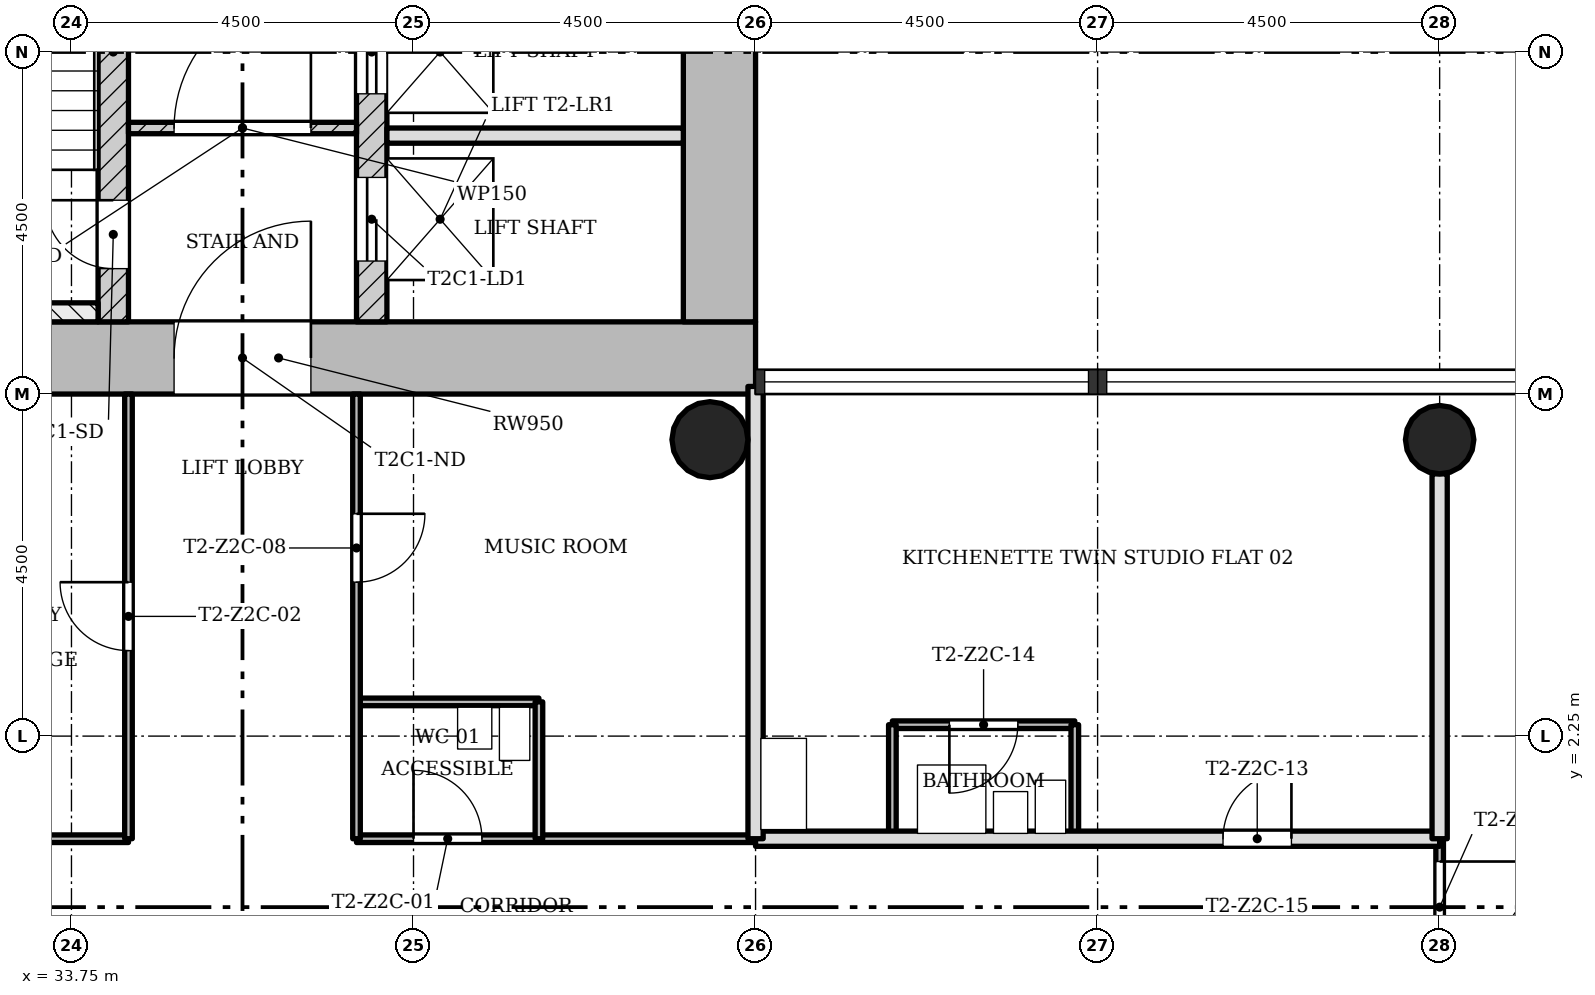
"""IFC4 building model, lengths in metres.
Left out: names, types, materials, properties, quantities, classifications, styles, units other than length and angle.
Written with IfcOpenShell. Run it as: python <this file> out.ifc"""

import sys

from ifc_helpers import new_model, si_unit, direction, frame, frame_2d, origin, origin_2d, place, context, subcontext, project, spatial, rectangle, hollow_circle, extrude, element, fill, save


model = new_model("IFC4")
c1 = context("Model", 3, precision=1e-05, world=origin(), true_north=direction((0.0, 1.0)))
c2 = subcontext(c1, "Body", "Model", "MODEL_VIEW")
j1 = project(units=[si_unit("LENGTHUNIT", "METRE"), si_unit("PLANEANGLEUNIT", "RADIAN")], contexts=[c1])
p1 = place(None, origin())
s1 = spatial("IfcSite", under=j1, at=p1, CompositionType="ELEMENT")
p2 = place(p1, origin())
s2 = spatial("IfcBuilding", under=s1, at=p2, CompositionType="ELEMENT")
p3 = place(p2, frame((0.0, 0.0, 90.2)))
s3 = spatial("IfcBuildingStorey", under=s2, at=p3, CompositionType="ELEMENT", Elevation=90.2)
p4 = place(p3, frame((30.2, 7.225, 0.0), z_axis=(0.0, 0.0, 1.0), x_axis=(1.0, 0.0, 0.0)))
e1 = element("IfcWall", 1, at=p4, inside=s3, PredefinedType="SHEAR", context=c2, shape_type="SweptSolid", body=[
    extrude(rectangle(XDim=12.55, YDim=0.95, at=frame_2d((6.275, 0.0))), origin(), (0.0, 0.0, 1.0), 3.4),
])
p5 = place(p4, frame((4.9, 0.0, 0.0)))
e2 = element("IfcOpeningElement", 2, at=p5, cuts=e1, PredefinedType="OPENING", context=c2, shape_type="SweptSolid", body=[
    extrude(rectangle(XDim=1.8, YDim=2.1, at=frame_2d((0.9, 1.05))), frame((0.0, 0.485, 0.0), z_axis=(0.0, -1.0, 0.0), x_axis=(1.0, 0.0, 0.0)), (0.0, 0.0, 1.0), 0.97),
])
p6 = place(p3, frame((42.275, 7.7, 0.0), z_axis=(0.0, 0.0, 1.0), x_axis=(0.0, 1.0, 0.0)))
e3 = element("IfcWall", 3, at=p6, inside=s3, PredefinedType="SHEAR", context=c2, shape_type="SweptSolid", body=[
    extrude(rectangle(XDim=8.05, YDim=0.95, at=frame_2d((4.025, 0.0))), origin(), (0.0, 0.0, 1.0), 3.4),
])
p7 = place(p3, frame((34.3, 7.7, 0.0), z_axis=(0.0, 0.0, 1.0), x_axis=(0.0, 1.0, 0.0)))
e4 = element("IfcWall", 4, at=p7, inside=s3, PredefinedType="SHEAR", context=c2, shape_type="SweptSolid", body=[
    extrude(rectangle(XDim=7.1, YDim=0.4, at=frame_2d((3.55, 0.0))), origin(), (0.0, 0.0, 1.0), 3.4),
])
p8 = place(p7, frame((0.7, 0.0, 0.0)))
e5 = element("IfcOpeningElement", 5, at=p8, cuts=e4, PredefinedType="OPENING", context=c2, shape_type="SweptSolid", body=[
    extrude(rectangle(XDim=0.9, YDim=2.1, at=frame_2d((0.45, 1.05))), frame((0.0, 0.21, 0.0), z_axis=(0.0, -1.0, 0.0), x_axis=(1.0, 0.0, 0.0)), (0.0, 0.0, 1.0), 0.42),
])
p9 = place(p3, frame((37.7, 7.7, 0.0), z_axis=(0.0, 0.0, 1.0), x_axis=(0.0, 1.0, 0.0)))
e6 = element("IfcWall", 6, at=p9, inside=s3, PredefinedType="SHEAR", context=c2, shape_type="SweptSolid", body=[
    extrude(rectangle(XDim=7.1, YDim=0.4, at=frame_2d((3.55, 0.0))), origin(), (0.0, 0.0, 1.0), 3.4),
])
p10 = place(p9, frame((0.8, 0.0, 0.0)))
e7 = element("IfcOpeningElement", 7, at=p10, cuts=e6, PredefinedType="OPENING", context=c2, shape_type="SweptSolid", body=[
    extrude(rectangle(XDim=1.1, YDim=2.1, at=frame_2d((0.55, 1.05))), frame((0.0, 0.21, 0.0), z_axis=(0.0, -1.0, 0.0), x_axis=(1.0, 0.0, 0.0)), (0.0, 0.0, 1.0), 0.42),
])
p11 = place(p9, frame((3.0, 0.0, 0.0)))
e8 = element("IfcOpeningElement", 8, at=p11, cuts=e6, PredefinedType="OPENING", context=c2, shape_type="SweptSolid", body=[
    extrude(rectangle(XDim=1.1, YDim=2.1, at=frame_2d((0.55, 1.05))), frame((0.0, 0.21, 0.0), z_axis=(0.0, -1.0, 0.0), x_axis=(1.0, 0.0, 0.0)), (0.0, 0.0, 1.0), 0.42),
])
p12 = place(p9, frame((5.2, 0.0, 0.0)))
e9 = element("IfcOpeningElement", 9, at=p12, cuts=e6, PredefinedType="OPENING", context=c2, shape_type="SweptSolid", body=[
    extrude(rectangle(XDim=1.1, YDim=2.1, at=frame_2d((0.55, 1.05))), frame((0.0, 0.21, 0.0), z_axis=(0.0, -1.0, 0.0), x_axis=(1.0, 0.0, 0.0)), (0.0, 0.0, 1.0), 0.42),
])
p13 = place(p3, frame((51.75, 6.15, 0.0), z_axis=(0.0, 0.0, 1.0), x_axis=(1.0, 0.0, 0.0)))
e10 = element("IfcColumn", 10, at=p13, inside=s3, PredefinedType="COLUMN", context=c2, shape_type="SweptSolid", body=[
    extrude(hollow_circle(Radius=0.45, WallThickness=0.032, at=origin_2d()), origin(), (0.0, 0.0, 1.0), 3.4),
])
p14 = place(p3, frame((42.15, 6.15, 0.0), z_axis=(0.0, 0.0, 1.0), x_axis=(1.0, 0.0, 0.0)))
e11 = element("IfcColumn", 11, at=p14, inside=s3, PredefinedType="COLUMN", context=c2, shape_type="SweptSolid", body=[
    extrude(hollow_circle(Radius=0.5, WallThickness=0.036, at=origin_2d()), origin(), (0.0, 0.0, 1.0), 3.4),
])
p15 = place(p3, frame((37.5, 10.25, 0.0), z_axis=(0.0, 0.0, 1.0), x_axis=(-1.0, 0.0, 0.0)))
e12 = element("IfcWall", 12, at=p15, inside=s3, PredefinedType="PARTITIONING", context=c2, shape_type="SweptSolid", body=[
    extrude(rectangle(XDim=3.0, YDim=0.15, at=frame_2d((1.5, 0.0))), origin(), (0.0, 0.0, 1.0), 3.0),
])
p16 = place(p15, frame((0.6, 0.0, 0.0)))
e13 = element("IfcOpeningElement", 13, at=p16, cuts=e12, PredefinedType="OPENING", context=c2, shape_type="SweptSolid", body=[
    extrude(rectangle(XDim=1.8, YDim=2.1, at=frame_2d((0.9, 1.05))), frame((0.0, 0.085, 0.0), z_axis=(0.0, -1.0, 0.0), x_axis=(1.0, 0.0, 0.0)), (0.0, 0.0, 1.0), 0.17),
])
p17 = place(p3, frame((41.8, 10.15, 0.0), z_axis=(0.0, 0.0, 1.0), x_axis=(-1.0, 0.0, 0.0)))
e14 = element("IfcWall", 14, at=p17, inside=s3, PredefinedType="SOLIDWALL", context=c2, shape_type="SweptSolid", body=[
    extrude(rectangle(XDim=3.9, YDim=0.2, at=frame_2d((1.95, 0.0))), origin(), (0.0, 0.0, 1.0), 3.0),
])
p18 = place(p3, frame((42.75, 0.9, 0.0), z_axis=(0.0, 0.0, 1.0), x_axis=(-1.0, 0.0, 0.0)))
e15 = element("IfcWall", 15, at=p18, inside=s3, PredefinedType="PARTITIONING", context=c2, shape_type="SweptSolid", body=[
    extrude(rectangle(XDim=5.25, YDim=0.1, at=frame_2d((2.625, 0.0))), origin(), (0.0, 0.0, 1.0), 3.0),
])
p19 = place(p18, frame((3.6, 0.0, 0.0)))
e16 = element("IfcOpeningElement", 16, at=p19, cuts=e15, PredefinedType="OPENING", context=c2, shape_type="SweptSolid", body=[
    extrude(rectangle(XDim=0.9, YDim=2.1, at=frame_2d((0.45, 1.05))), frame((0.0, 0.06, 0.0), z_axis=(0.0, -1.0, 0.0), x_axis=(1.0, 0.0, 0.0)), (0.0, 0.0, 1.0), 0.12),
])
p20 = place(p3, frame((34.5, 0.9, 0.0), z_axis=(0.0, 0.0, 1.0), x_axis=(-1.0, 0.0, 0.0)))
e17 = element("IfcWall", 17, at=p20, inside=s3, PredefinedType="PARTITIONING", context=c2, shape_type="SweptSolid", body=[
    extrude(rectangle(XDim=5.25, YDim=0.1, at=frame_2d((2.625, 0.0))), origin(), (0.0, 0.0, 1.0), 3.0),
])
p21 = place(p20, frame((3.225, 0.0, 0.0)))
e18 = element("IfcOpeningElement", 18, at=p21, cuts=e17, PredefinedType="OPENING", context=c2, shape_type="SweptSolid", body=[
    extrude(rectangle(XDim=0.9, YDim=2.1, at=frame_2d((0.45, 1.05))), frame((0.0, 0.06, 0.0), z_axis=(0.0, -1.0, 0.0), x_axis=(1.0, 0.0, 0.0)), (0.0, 0.0, 1.0), 0.12),
])
p22 = place(p3, frame((51.75, 0.9, 0.0), z_axis=(0.0, 0.0, 1.0), x_axis=(-1.0, 0.0, 0.0)))
e19 = element("IfcWall", 19, at=p22, inside=s3, PredefinedType="SOLIDWALL", context=c2, shape_type="SweptSolid", body=[
    extrude(rectangle(XDim=9.0, YDim=0.2, at=frame_2d((4.5, 0.0))), origin(), (0.0, 0.0, 1.0), 3.0),
])
p23 = place(p22, frame((1.95, 0.0, 0.0)))
e20 = element("IfcOpeningElement", 20, at=p23, cuts=e19, PredefinedType="OPENING", context=c2, shape_type="SweptSolid", body=[
    extrude(rectangle(XDim=0.9, YDim=2.1, at=frame_2d((0.45, 1.05))), frame((0.0, 0.11, 0.0), z_axis=(0.0, -1.0, 0.0), x_axis=(1.0, 0.0, 0.0)), (0.0, 0.0, 1.0), 0.22),
])
p24 = place(p3, frame((46.95, 2.4, 0.0), z_axis=(0.0, 0.0, 1.0), x_axis=(-1.0, 0.0, 0.0)))
e21 = element("IfcWall", 21, at=p24, inside=s3, PredefinedType="PARTITIONING", context=c2, shape_type="SweptSolid", body=[
    extrude(rectangle(XDim=2.4, YDim=0.1, at=frame_2d((1.2, 0.0))), origin(), (0.0, 0.0, 1.0), 3.0),
])
p25 = place(p24, frame((0.75, 0.0, 0.0)))
e22 = element("IfcOpeningElement", 22, at=p25, cuts=e21, PredefinedType="OPENING", context=c2, shape_type="SweptSolid", body=[
    extrude(rectangle(XDim=0.9, YDim=2.1, at=frame_2d((0.45, 1.05))), frame((0.0, 0.06, 0.0), z_axis=(0.0, -1.0, 0.0), x_axis=(1.0, 0.0, 0.0)), (0.0, 0.0, 1.0), 0.12),
])
p26 = place(p3, frame((39.9, 2.7, 0.0), z_axis=(0.0, 0.0, 1.0), x_axis=(-1.0, 0.0, 0.0)))
e23 = element("IfcWall", 23, at=p26, inside=s3, PredefinedType="PARTITIONING", context=c2, shape_type="SweptSolid", body=[
    extrude(rectangle(XDim=2.4, YDim=0.1, at=frame_2d((1.2, 0.0))), origin(), (0.0, 0.0, 1.0), 3.0),
])
p27 = place(p3, frame((51.75, -0.9, 0.0), z_axis=(0.0, 0.0, 1.0), x_axis=(0.0, 1.0, 0.0)))
e24 = element("IfcWall", 24, at=p27, inside=s3, PredefinedType="PARTITIONING", context=c2, shape_type="SweptSolid", body=[
    extrude(rectangle(XDim=1.8, YDim=0.1, at=frame_2d((0.9, 0.0))), origin(), (0.0, 0.0, 1.0), 3.0),
])
p28 = place(p27, frame((0.3, 0.0, 0.0)))
e25 = element("IfcOpeningElement", 25, at=p28, cuts=e24, PredefinedType="OPENING", context=c2, shape_type="SweptSolid", body=[
    extrude(rectangle(XDim=1.2, YDim=2.1, at=frame_2d((0.6, 1.05))), frame((0.0, 0.06, 0.0), z_axis=(0.0, -1.0, 0.0), x_axis=(1.0, 0.0, 0.0)), (0.0, 0.0, 1.0), 0.12),
])
p29 = place(p3, frame((51.75, 0.9, 0.0), z_axis=(0.0, 0.0, 1.0), x_axis=(0.0, 1.0, 0.0)))
e26 = element("IfcWall", 26, at=p29, inside=s3, PredefinedType="SOLIDWALL", context=c2, shape_type="SweptSolid", body=[
    extrude(rectangle(XDim=4.8, YDim=0.2, at=frame_2d((2.4, 0.0))), origin(), (0.0, 0.0, 1.0), 3.0),
])
for number, where, z_axis, x_axis in (
    (27, (46.95, 0.9, 0.0), (0.0, 0.0, 1.0), (0.0, 1.0, 0.0)),
    (28, (44.55, 0.9, 0.0), (0.0, 0.0, 1.0), (0.0, 1.0, 0.0)),
):
    element("IfcWall", number, at=place(p3, frame(where, z_axis=z_axis, x_axis=x_axis)), inside=s3, PredefinedType="PARTITIONING", context=c2, shape_type="SweptSolid", body=[
        extrude(rectangle(XDim=1.5, YDim=0.1, at=frame_2d((0.75, 0.0))), origin(), (0.0, 0.0, 1.0), 3.0),
    ])
p30 = place(p3, frame((42.75, 0.9, 0.0), z_axis=(0.0, 0.0, 1.0), x_axis=(0.0, 1.0, 0.0)))
e29 = element("IfcWall", 29, at=p30, inside=s3, PredefinedType="SOLIDWALL", context=c2, shape_type="SweptSolid", body=[
    extrude(rectangle(XDim=5.95, YDim=0.2, at=frame_2d((2.975, 0.0))), origin(), (0.0, 0.0, 1.0), 3.0),
])
p31 = place(p3, frame((39.9, 0.9, 0.0), z_axis=(0.0, 0.0, 1.0), x_axis=(0.0, 1.0, 0.0)))
e30 = element("IfcWall", 30, at=p31, inside=s3, PredefinedType="PARTITIONING", context=c2, shape_type="SweptSolid", body=[
    extrude(rectangle(XDim=1.8, YDim=0.1, at=frame_2d((0.9, 0.0))), origin(), (0.0, 0.0, 1.0), 3.0),
])
p32 = place(p3, frame((37.5, 0.9, 0.0), z_axis=(0.0, 0.0, 1.0), x_axis=(0.0, 1.0, 0.0)))
e31 = element("IfcWall", 31, at=p32, inside=s3, PredefinedType="PARTITIONING", context=c2, shape_type="SweptSolid", body=[
    extrude(rectangle(XDim=5.85, YDim=0.1, at=frame_2d((2.925, 0.0))), origin(), (0.0, 0.0, 1.0), 3.0),
])
p33 = place(p32, frame((3.375, 0.0, 0.0)))
e32 = element("IfcOpeningElement", 32, at=p33, cuts=e31, PredefinedType="OPENING", context=c2, shape_type="SweptSolid", body=[
    extrude(rectangle(XDim=0.9, YDim=2.1, at=frame_2d((0.45, 1.05))), frame((0.0, 0.06, 0.0), z_axis=(0.0, -1.0, 0.0), x_axis=(1.0, 0.0, 0.0)), (0.0, 0.0, 1.0), 0.12),
])
p34 = place(p3, frame((34.5, 0.9, 0.0), z_axis=(0.0, 0.0, 1.0), x_axis=(0.0, 1.0, 0.0)))
e33 = element("IfcWall", 33, at=p34, inside=s3, PredefinedType="PARTITIONING", context=c2, shape_type="SweptSolid", body=[
    extrude(rectangle(XDim=5.85, YDim=0.1, at=frame_2d((2.925, 0.0))), origin(), (0.0, 0.0, 1.0), 3.0),
])
p35 = place(p34, frame((2.475, 0.0, 0.0)))
e34 = element("IfcOpeningElement", 34, at=p35, cuts=e33, PredefinedType="OPENING", context=c2, shape_type="SweptSolid", body=[
    extrude(rectangle(XDim=0.9, YDim=2.1, at=frame_2d((0.45, 1.05))), frame((0.0, 0.06, 0.0), z_axis=(0.0, -1.0, 0.0), x_axis=(1.0, 0.0, 0.0)), (0.0, 0.0, 1.0), 0.12),
])
p36 = place(p3, frame((34.1, 7.825, 0.0), z_axis=(0.0, 0.0, 1.0), x_axis=(-1.0, 0.0, 0.0)))
e35 = element("IfcWall", 35, at=p36, inside=s3, PredefinedType="SHEAR", context=c2, shape_type="SweptSolid", body=[
    extrude(rectangle(XDim=3.9, YDim=0.25, at=frame_2d((1.95, 0.0))), origin(), (0.0, 0.0, 1.0), 3.4),
])
p37 = place(p16, origin())
e36 = element("IfcDoor", 36, at=p37, inside=s3, OperationType="SINGLE_SWING_LEFT", PredefinedType="DOOR", context=c2, shape_type="SweptSolid", body=[
    extrude(rectangle(XDim=1.8, YDim=2.1, at=frame_2d((0.9, 1.05))), frame((0.0, 0.025, 0.0), z_axis=(0.0, -1.0, 0.0), x_axis=(1.0, 0.0, 0.0)), (0.0, 0.0, 1.0), 0.05),
])
fill(e13, e36)
p38 = place(p19, origin())
e37 = element("IfcDoor", 37, at=p38, inside=s3, OperationType="SINGLE_SWING_RIGHT", PredefinedType="DOOR", context=c2, shape_type="SweptSolid", body=[
    extrude(rectangle(XDim=0.9, YDim=2.1, at=frame_2d((0.45, 1.05))), frame((0.0, 0.025, 0.0), z_axis=(0.0, -1.0, 0.0), x_axis=(1.0, 0.0, 0.0)), (0.0, 0.0, 1.0), 0.05),
])
fill(e16, e37)
p39 = place(p35, origin())
e38 = element("IfcDoor", 38, at=p39, inside=s3, OperationType="SINGLE_SWING_LEFT", PredefinedType="DOOR", context=c2, shape_type="SweptSolid", body=[
    extrude(rectangle(XDim=0.9, YDim=2.1, at=frame_2d((0.45, 1.05))), frame((0.0, 0.025, 0.0), z_axis=(0.0, -1.0, 0.0), x_axis=(1.0, 0.0, 0.0)), (0.0, 0.0, 1.0), 0.05),
])
fill(e34, e38)
p40 = place(p33, origin())
e39 = element("IfcDoor", 39, at=p40, inside=s3, OperationType="SINGLE_SWING_RIGHT", PredefinedType="DOOR", context=c2, shape_type="SweptSolid", body=[
    extrude(rectangle(XDim=0.9, YDim=2.1, at=frame_2d((0.45, 1.05))), frame((0.0, 0.025, 0.0), z_axis=(0.0, -1.0, 0.0), x_axis=(1.0, 0.0, 0.0)), (0.0, 0.0, 1.0), 0.05),
])
fill(e32, e39)
p41 = place(p23, origin())
e40 = element("IfcDoor", 40, at=p41, inside=s3, OperationType="SINGLE_SWING_LEFT", PredefinedType="DOOR", context=c2, shape_type="SweptSolid", body=[
    extrude(rectangle(XDim=0.9, YDim=2.1, at=frame_2d((0.45, 1.05))), frame((0.0, 0.025, 0.0), z_axis=(0.0, -1.0, 0.0), x_axis=(1.0, 0.0, 0.0)), (0.0, 0.0, 1.0), 0.05),
])
fill(e20, e40)
p42 = place(p25, origin())
e41 = element("IfcDoor", 41, at=p42, inside=s3, OperationType="SINGLE_SWING_LEFT", PredefinedType="DOOR", context=c2, shape_type="SweptSolid", body=[
    extrude(rectangle(XDim=0.9, YDim=2.1, at=frame_2d((0.45, 1.05))), frame((0.0, 0.025, 0.0), z_axis=(0.0, -1.0, 0.0), x_axis=(1.0, 0.0, 0.0)), (0.0, 0.0, 1.0), 0.05),
])
fill(e22, e41)
p43 = place(p28, origin())
e42 = element("IfcDoor", 42, at=p43, inside=s3, OperationType="SINGLE_SWING_RIGHT", PredefinedType="DOOR", context=c2, shape_type="SweptSolid", body=[
    extrude(rectangle(XDim=1.2, YDim=2.1, at=frame_2d((0.6, 1.05))), frame((0.0, 0.025, 0.0), z_axis=(0.0, -1.0, 0.0), x_axis=(1.0, 0.0, 0.0)), (0.0, 0.0, 1.0), 0.05),
])
fill(e25, e42)
p44 = place(p8, origin())
e43 = element("IfcDoor", 43, at=p44, inside=s3, OperationType="SINGLE_SWING_LEFT", PredefinedType="DOOR", context=c2, shape_type="SweptSolid", body=[
    extrude(rectangle(XDim=0.9, YDim=2.1, at=frame_2d((0.45, 1.05))), frame((0.0, 0.025, 0.0), z_axis=(0.0, -1.0, 0.0), x_axis=(1.0, 0.0, 0.0)), (0.0, 0.0, 1.0), 0.05),
])
fill(e5, e43)
p45 = place(p10, origin())
e44 = element("IfcDoor", 44, at=p45, inside=s3, OperationType="SLIDING_TO_LEFT", PredefinedType="DOOR", context=c2, shape_type="SweptSolid", body=[
    extrude(rectangle(XDim=1.1, YDim=2.1, at=frame_2d((0.55, 1.05))), frame((0.0, 0.025, 0.0), z_axis=(0.0, -1.0, 0.0), x_axis=(1.0, 0.0, 0.0)), (0.0, 0.0, 1.0), 0.05),
])
fill(e7, e44)
p46 = place(p11, origin())
e45 = element("IfcDoor", 45, at=p46, inside=s3, OperationType="SLIDING_TO_LEFT", PredefinedType="DOOR", context=c2, shape_type="SweptSolid", body=[
    extrude(rectangle(XDim=1.1, YDim=2.1, at=frame_2d((0.55, 1.05))), frame((0.0, 0.025, 0.0), z_axis=(0.0, -1.0, 0.0), x_axis=(1.0, 0.0, 0.0)), (0.0, 0.0, 1.0), 0.05),
])
fill(e8, e45)
p47 = place(p5, origin())
e46 = element("IfcDoor", 46, at=p47, inside=s3, OperationType="SINGLE_SWING_LEFT", PredefinedType="DOOR", context=c2, shape_type="SweptSolid", body=[
    extrude(rectangle(XDim=1.8, YDim=2.1, at=frame_2d((0.9, 1.05))), frame((0.0, 0.025, 0.0), z_axis=(0.0, -1.0, 0.0), x_axis=(1.0, 0.0, 0.0)), (0.0, 0.0, 1.0), 0.05),
])
fill(e2, e46)
save(model, sys.argv[1])
